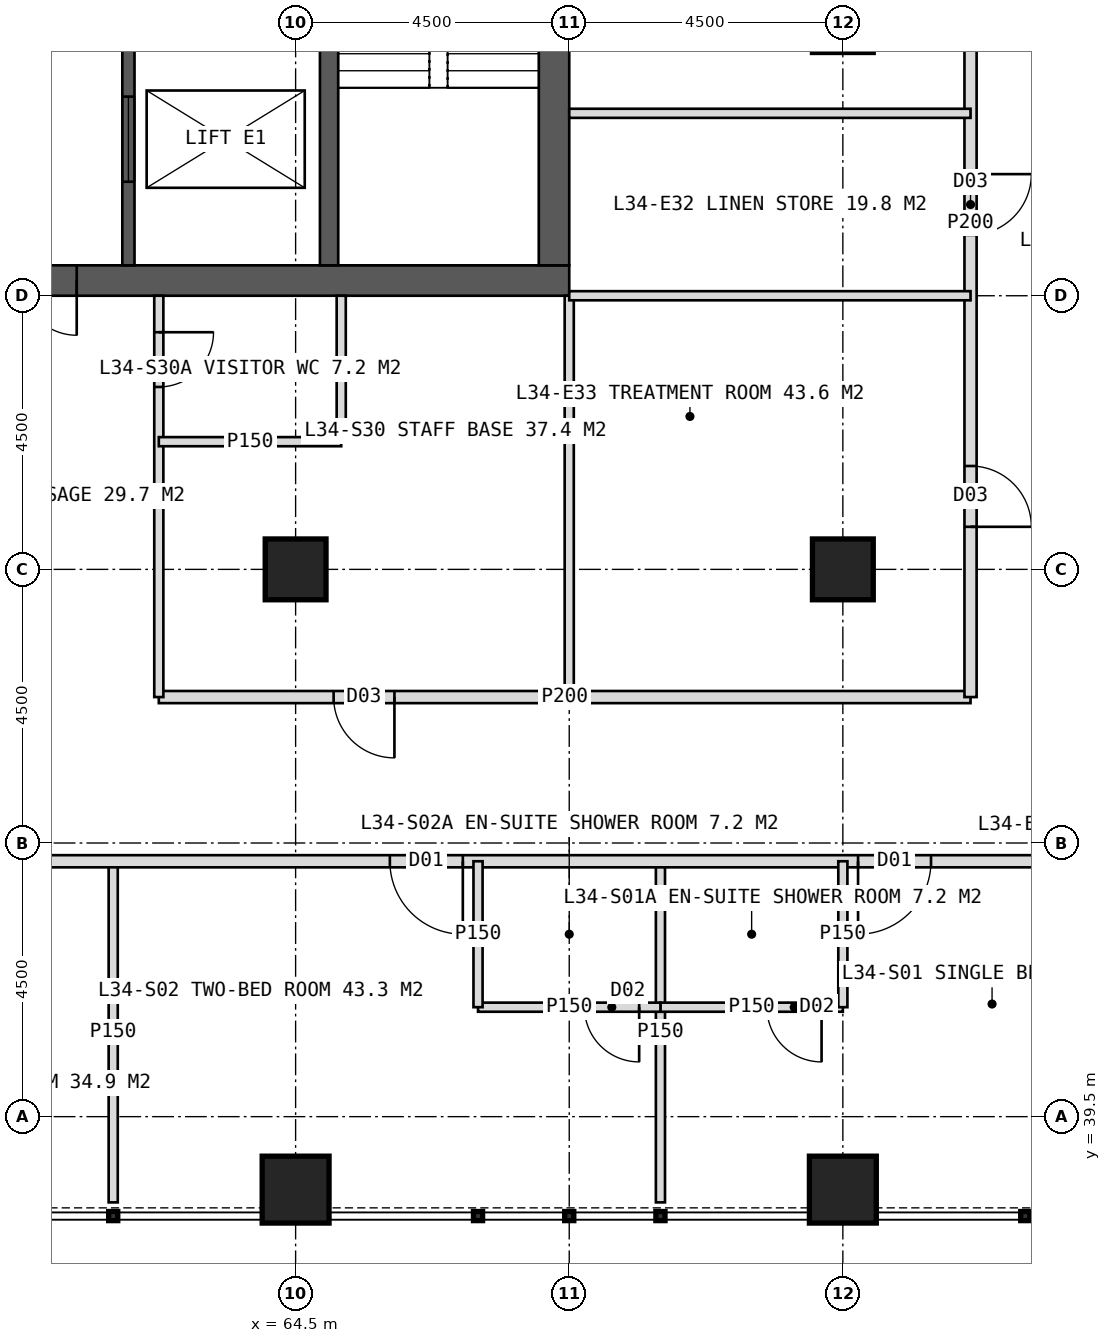
"""IFC4 building model, lengths in metres.
Left out: names, types, materials, properties, quantities, classifications, styles, units other than length and angle.
Written with IfcOpenShell. Run it as: python <this file> out.ifc"""

import sys

from ifc_helpers import new_model, si_unit, direction, frame, frame_2d, origin, origin_2d, place, context, subcontext, project, spatial, rectangle, hollow_rectangle, extrude, element, fill, save


model = new_model("IFC4")
c1 = context("Model", 3, precision=1e-05, world=origin(), true_north=direction((0.0, 1.0)))
c2 = subcontext(c1, "Body", "Model", "MODEL_VIEW")
j1 = project(units=[si_unit("LENGTHUNIT", "METRE"), si_unit("PLANEANGLEUNIT", "RADIAN")], contexts=[c1])
p1 = place(None, origin())
s1 = spatial("IfcSite", under=j1, at=p1, CompositionType="ELEMENT")
p2 = place(p1, origin())
s2 = spatial("IfcBuilding", under=s1, at=p2, CompositionType="ELEMENT")
p3 = place(p2, frame((0.0, 0.0, 144.0)))
s3 = spatial("IfcBuildingStorey", under=s2, at=p3, CompositionType="ELEMENT", Elevation=144.0)
p4 = place(p3, frame((51.0, 53.25, 0.0), z_axis=(0.0, 0.0, 1.0), x_axis=(1.0, 0.0, 0.0)))
e1 = element("IfcWall", 1, at=p4, inside=s3, PredefinedType="SHEAR", context=c2, shape_type="SweptSolid", body=[
    extrude(rectangle(XDim=18.0, YDim=0.5, at=frame_2d((9.0, 0.0))), origin(), (0.0, 0.0, 1.0), 4.0),
])
p5 = place(p4, frame((8.1, 0.0, 0.0)))
e2 = element("IfcOpeningElement", 2, at=p5, cuts=e1, PredefinedType="OPENING", context=c2, shape_type="SweptSolid", body=[
    extrude(rectangle(XDim=1.8, YDim=2.2, at=frame_2d((0.9, 1.1))), frame((0.0, 0.26, 0.0), z_axis=(0.0, -1.0, 0.0), x_axis=(1.0, 0.0, 0.0)), (0.0, 0.0, 1.0), 0.52),
])
p6 = place(p3, frame((68.75, 53.5, 0.0), z_axis=(0.0, 0.0, 1.0), x_axis=(0.0, 1.0, 0.0)))
e3 = element("IfcWall", 3, at=p6, inside=s3, PredefinedType="SHEAR", context=c2, shape_type="SweptSolid", body=[
    extrude(rectangle(XDim=17.0, YDim=0.5, at=frame_2d((8.5, 0.0))), origin(), (0.0, 0.0, 1.0), 4.0),
])
p7 = place(p6, frame((9.5, 0.0, 0.0)))
e4 = element("IfcOpeningElement", 4, at=p7, cuts=e3, PredefinedType="OPENING", context=c2, shape_type="SweptSolid", body=[
    extrude(rectangle(XDim=1.5, YDim=2.2, at=frame_2d((0.75, 1.1))), frame((0.0, 0.26, 0.0), z_axis=(0.0, -1.0, 0.0), x_axis=(1.0, 0.0, 0.0)), (0.0, 0.0, 1.0), 0.52),
])
p8 = place(p3, frame((65.05, 53.5, 0.0), z_axis=(0.0, 0.0, 1.0), x_axis=(0.0, 1.0, 0.0)))
e5 = element("IfcWall", 5, at=p8, inside=s3, PredefinedType="SHEAR", context=c2, shape_type="SweptSolid", body=[
    extrude(rectangle(XDim=17.0, YDim=0.3, at=frame_2d((8.5, 0.0))), origin(), (0.0, 0.0, 1.0), 4.0),
])
p9 = place(p3, frame((61.75, 53.5, 0.0), z_axis=(0.0, 0.0, 1.0), x_axis=(0.0, 1.0, 0.0)))
e6 = element("IfcWall", 6, at=p9, inside=s3, PredefinedType="SHEAR", context=c2, shape_type="SweptSolid", body=[
    extrude(rectangle(XDim=17.0, YDim=0.2, at=frame_2d((8.5, 0.0))), origin(), (0.0, 0.0, 1.0), 4.0),
])
p10 = place(p9, frame((1.375, 0.0, 0.0)))
e7 = element("IfcOpeningElement", 7, at=p10, cuts=e6, PredefinedType="OPENING", context=c2, shape_type="SweptSolid", body=[
    extrude(rectangle(XDim=1.4, YDim=2.2, at=frame_2d((0.7, 1.1))), frame((0.0, 0.11, 0.0), z_axis=(0.0, -1.0, 0.0), x_axis=(1.0, 0.0, 0.0)), (0.0, 0.0, 1.0), 0.22),
])
p11 = place(p9, frame((5.675, 0.0, 0.0)))
e8 = element("IfcOpeningElement", 8, at=p11, cuts=e6, PredefinedType="OPENING", context=c2, shape_type="SweptSolid", body=[
    extrude(rectangle(XDim=1.4, YDim=2.2, at=frame_2d((0.7, 1.1))), frame((0.0, 0.11, 0.0), z_axis=(0.0, -1.0, 0.0), x_axis=(1.0, 0.0, 0.0)), (0.0, 0.0, 1.0), 0.22),
])
for number, where, z_axis, x_axis in (
    (9, (73.5, 48.5, 0.0), (0.0, 0.0, 1.0), (1.0, 0.0, 0.0)),
    (10, (64.5, 48.5, 0.0), (0.0, 0.0, 1.0), (1.0, 0.0, 0.0)),
):
    element("IfcColumn", number, at=place(p3, frame(where, z_axis=z_axis, x_axis=x_axis)), inside=s3, PredefinedType="COLUMN", context=c2, shape_type="SweptSolid", body=[
        extrude(hollow_rectangle(XDim=1.0, YDim=1.0, WallThickness=0.1, at=origin_2d()), origin(), (0.0, 0.0, 1.0), 4.0),
    ])
for number, where, z_axis, x_axis in (
    (11, (64.5, 38.3, 0.0), (0.0, 0.0, 1.0), (1.0, 0.0, 0.0)),
    (12, (73.5, 38.3, 0.0), (0.0, 0.0, 1.0), (1.0, 0.0, 0.0)),
):
    element("IfcColumn", number, at=place(p3, frame(where, z_axis=z_axis, x_axis=x_axis)), inside=s3, PredefinedType="COLUMN", context=c2, shape_type="SweptSolid", body=[
        extrude(hollow_rectangle(XDim=1.1, YDim=1.1, WallThickness=0.1, at=origin_2d()), origin(), (0.0, 0.0, 1.0), 4.0),
    ])
for number, where, z_axis, x_axis in (
    (13, (70.5, 43.7, 0.0), (0.0, 0.0, 1.0), (0.0, -1.0, 0.0)),
    (14, (61.5, 43.7, 0.0), (0.0, 0.0, 1.0), (0.0, -1.0, 0.0)),
):
    element("IfcWall", number, at=place(p3, frame(where, z_axis=z_axis, x_axis=x_axis)), inside=s3, PredefinedType="PARTITIONING", context=c2, shape_type="SweptSolid", body=[
        extrude(rectangle(XDim=5.61, YDim=0.15, at=frame_2d((2.805, 0.0))), origin(), (0.0, 0.0, 1.0), 3.75),
    ])
p12 = place(p3, frame((78.3, 43.7, 0.0), z_axis=(0.0, 0.0, 1.0), x_axis=(-1.0, 0.0, 0.0)))
e15 = element("IfcWall", 15, at=p12, inside=s3, PredefinedType="PARTITIONING", context=c2, shape_type="SweptSolid", body=[
    extrude(rectangle(XDim=36.6, YDim=0.2, at=frame_2d((18.3, 0.0))), origin(), (0.0, 0.0, 1.0), 3.75),
])
p13 = place(p12, frame((3.35, 0.0, 0.0)))
e16 = element("IfcOpeningElement", 16, at=p13, cuts=e15, PredefinedType="OPENING", context=c2, shape_type="SweptSolid", body=[
    extrude(rectangle(XDim=1.2, YDim=2.2, at=frame_2d((0.6, 1.1))), frame((0.0, 0.11, 0.0), z_axis=(0.0, -1.0, 0.0), x_axis=(1.0, 0.0, 0.0)), (0.0, 0.0, 1.0), 0.22),
])
p14 = place(p12, frame((11.05, 0.0, 0.0)))
e17 = element("IfcOpeningElement", 17, at=p14, cuts=e15, PredefinedType="OPENING", context=c2, shape_type="SweptSolid", body=[
    extrude(rectangle(XDim=1.2, YDim=2.2, at=frame_2d((0.6, 1.1))), frame((0.0, 0.11, 0.0), z_axis=(0.0, -1.0, 0.0), x_axis=(1.0, 0.0, 0.0)), (0.0, 0.0, 1.0), 0.22),
])
p15 = place(p12, frame((19.85, 0.0, 0.0)))
e18 = element("IfcOpeningElement", 18, at=p15, cuts=e15, PredefinedType="OPENING", context=c2, shape_type="SweptSolid", body=[
    extrude(rectangle(XDim=1.2, YDim=2.2, at=frame_2d((0.6, 1.1))), frame((0.0, 0.11, 0.0), z_axis=(0.0, -1.0, 0.0), x_axis=(1.0, 0.0, 0.0)), (0.0, 0.0, 1.0), 0.22),
])
p16 = place(p12, frame((26.95, 0.0, 0.0)))
e19 = element("IfcOpeningElement", 19, at=p16, cuts=e15, PredefinedType="OPENING", context=c2, shape_type="SweptSolid", body=[
    extrude(rectangle(XDim=1.2, YDim=2.2, at=frame_2d((0.6, 1.1))), frame((0.0, 0.11, 0.0), z_axis=(0.0, -1.0, 0.0), x_axis=(1.0, 0.0, 0.0)), (0.0, 0.0, 1.0), 0.22),
])
p17 = place(p3, frame((73.5, 41.3, 0.0), z_axis=(0.0, 0.0, 1.0), x_axis=(-1.0, 0.0, 0.0)))
e20 = element("IfcWall", 20, at=p17, inside=s3, PredefinedType="PARTITIONING", context=c2, shape_type="SweptSolid", body=[
    extrude(rectangle(XDim=3.0, YDim=0.15, at=frame_2d((1.5, 0.0))), origin(), (0.0, 0.0, 1.0), 3.75),
])
p18 = place(p17, frame((0.35, 0.0, 0.0)))
e21 = element("IfcOpeningElement", 21, at=p18, cuts=e20, PredefinedType="OPENING", context=c2, shape_type="SweptSolid", body=[
    extrude(rectangle(XDim=0.9, YDim=2.1, at=frame_2d((0.45, 1.05))), frame((0.0, 0.085, 0.0), z_axis=(0.0, -1.0, 0.0), x_axis=(1.0, 0.0, 0.0)), (0.0, 0.0, 1.0), 0.17),
])
p19 = place(p3, frame((73.5, 43.7, 0.0), z_axis=(0.0, 0.0, 1.0), x_axis=(0.0, -1.0, 0.0)))
e22 = element("IfcWall", 22, at=p19, inside=s3, PredefinedType="PARTITIONING", context=c2, shape_type="SweptSolid", body=[
    extrude(rectangle(XDim=2.4, YDim=0.15, at=frame_2d((1.2, 0.0))), origin(), (0.0, 0.0, 1.0), 2.95),
])
p20 = place(p3, frame((70.5, 41.3, 0.0), z_axis=(0.0, 0.0, 1.0), x_axis=(-1.0, 0.0, 0.0)))
e23 = element("IfcWall", 23, at=p20, inside=s3, PredefinedType="PARTITIONING", context=c2, shape_type="SweptSolid", body=[
    extrude(rectangle(XDim=3.0, YDim=0.15, at=frame_2d((1.5, 0.0))), origin(), (0.0, 0.0, 1.0), 3.75),
])
p21 = place(p20, frame((0.35, 0.0, 0.0)))
e24 = element("IfcOpeningElement", 24, at=p21, cuts=e23, PredefinedType="OPENING", context=c2, shape_type="SweptSolid", body=[
    extrude(rectangle(XDim=0.9, YDim=2.1, at=frame_2d((0.45, 1.05))), frame((0.0, 0.085, 0.0), z_axis=(0.0, -1.0, 0.0), x_axis=(1.0, 0.0, 0.0)), (0.0, 0.0, 1.0), 0.17),
])
p22 = place(p3, frame((67.5, 43.7, 0.0), z_axis=(0.0, 0.0, 1.0), x_axis=(0.0, -1.0, 0.0)))
e25 = element("IfcWall", 25, at=p22, inside=s3, PredefinedType="PARTITIONING", context=c2, shape_type="SweptSolid", body=[
    extrude(rectangle(XDim=2.4, YDim=0.15, at=frame_2d((1.2, 0.0))), origin(), (0.0, 0.0, 1.0), 3.75),
])
p23 = place(p3, frame((69.0, 53.0, 0.0), z_axis=(0.0, 0.0, 1.0), x_axis=(0.0, -1.0, 0.0)))
e26 = element("IfcWall", 26, at=p23, inside=s3, PredefinedType="PARTITIONING", context=c2, shape_type="SweptSolid", body=[
    extrude(rectangle(XDim=6.6, YDim=0.15, at=frame_2d((3.3, 0.0))), origin(), (0.0, 0.0, 1.0), 3.75),
])
p24 = place(p3, frame((75.6, 46.4, 0.0), z_axis=(0.0, 0.0, 1.0), x_axis=(-1.0, 0.0, 0.0)))
e27 = element("IfcWall", 27, at=p24, inside=s3, PredefinedType="PARTITIONING", context=c2, shape_type="SweptSolid", body=[
    extrude(rectangle(XDim=13.35, YDim=0.2, at=frame_2d((6.675, 0.0))), origin(), (0.0, 0.0, 1.0), 3.75),
])
p25 = place(p24, frame((9.475, 0.0, 0.0)))
e28 = element("IfcOpeningElement", 28, at=p25, cuts=e27, PredefinedType="OPENING", context=c2, shape_type="SweptSolid", body=[
    extrude(rectangle(XDim=1.0, YDim=2.1, at=frame_2d((0.5, 1.05))), frame((0.0, 0.11, 0.0), z_axis=(0.0, -1.0, 0.0), x_axis=(1.0, 0.0, 0.0)), (0.0, 0.0, 1.0), 0.22),
])
p26 = place(p3, frame((62.25, 53.0, 0.0), z_axis=(0.0, 0.0, 1.0), x_axis=(0.0, -1.0, 0.0)))
e29 = element("IfcWall", 29, at=p26, inside=s3, PredefinedType="PARTITIONING", context=c2, shape_type="SweptSolid", body=[
    extrude(rectangle(XDim=6.6, YDim=0.15, at=frame_2d((3.3, 0.0))), origin(), (0.0, 0.0, 1.0), 3.75),
])
p27 = place(p26, frame((0.6, 0.0, 0.0)))
e30 = element("IfcOpeningElement", 30, at=p27, cuts=e29, PredefinedType="OPENING", context=c2, shape_type="SweptSolid", body=[
    extrude(rectangle(XDim=0.9, YDim=2.1, at=frame_2d((0.45, 1.05))), frame((0.0, 0.085, 0.0), z_axis=(0.0, -1.0, 0.0), x_axis=(1.0, 0.0, 0.0)), (0.0, 0.0, 1.0), 0.17),
])
p28 = place(p3, frame((65.25, 50.6, 0.0), z_axis=(0.0, 0.0, 1.0), x_axis=(-1.0, 0.0, 0.0)))
e31 = element("IfcWall", 31, at=p28, inside=s3, PredefinedType="PARTITIONING", context=c2, shape_type="SweptSolid", body=[
    extrude(rectangle(XDim=3.0, YDim=0.15, at=frame_2d((1.5, 0.0))), origin(), (0.0, 0.0, 1.0), 3.75),
])
p29 = place(p3, frame((65.25, 53.0, 0.0), z_axis=(0.0, 0.0, 1.0), x_axis=(0.0, -1.0, 0.0)))
e32 = element("IfcWall", 32, at=p29, inside=s3, PredefinedType="PARTITIONING", context=c2, shape_type="SweptSolid", body=[
    extrude(rectangle(XDim=2.4, YDim=0.15, at=frame_2d((1.2, 0.0))), origin(), (0.0, 0.0, 1.0), 3.75),
])
p30 = place(p3, frame((75.6, 62.0, 0.0), z_axis=(0.0, 0.0, 1.0), x_axis=(0.0, -1.0, 0.0)))
e33 = element("IfcWall", 33, at=p30, inside=s3, PredefinedType="PARTITIONING", context=c2, shape_type="SweptSolid", body=[
    extrude(rectangle(XDim=15.6, YDim=0.2, at=frame_2d((7.8, 0.0))), origin(), (0.0, 0.0, 1.0), 3.75),
])
p31 = place(p30, frame((2.5, 0.0, 0.0)))
e34 = element("IfcOpeningElement", 34, at=p31, cuts=e33, PredefinedType="OPENING", context=c2, shape_type="SweptSolid", body=[
    extrude(rectangle(XDim=1.0, YDim=2.1, at=frame_2d((0.5, 1.05))), frame((0.0, 0.11, 0.0), z_axis=(0.0, -1.0, 0.0), x_axis=(1.0, 0.0, 0.0)), (0.0, 0.0, 1.0), 0.22),
])
p32 = place(p30, frame((7.0, 0.0, 0.0)))
e35 = element("IfcOpeningElement", 35, at=p32, cuts=e33, PredefinedType="OPENING", context=c2, shape_type="SweptSolid", body=[
    extrude(rectangle(XDim=1.0, YDim=2.1, at=frame_2d((0.5, 1.05))), frame((0.0, 0.11, 0.0), z_axis=(0.0, -1.0, 0.0), x_axis=(1.0, 0.0, 0.0)), (0.0, 0.0, 1.0), 0.22),
])
p33 = place(p30, frame((11.8, 0.0, 0.0)))
e36 = element("IfcOpeningElement", 36, at=p33, cuts=e33, PredefinedType="OPENING", context=c2, shape_type="SweptSolid", body=[
    extrude(rectangle(XDim=1.0, YDim=2.1, at=frame_2d((0.5, 1.05))), frame((0.0, 0.11, 0.0), z_axis=(0.0, -1.0, 0.0), x_axis=(1.0, 0.0, 0.0)), (0.0, 0.0, 1.0), 0.22),
])
for number, where, z_axis, x_axis in (
    (37, (69.0, 56.0, 0.0), (0.0, 0.0, 1.0), (1.0, 0.0, 0.0)),
    (38, (69.0, 53.0, 0.0), (0.0, 0.0, 1.0), (1.0, 0.0, 0.0)),
):
    element("IfcWall", number, at=place(p3, frame(where, z_axis=z_axis, x_axis=x_axis)), inside=s3, PredefinedType="PARTITIONING", context=c2, shape_type="SweptSolid", body=[
        extrude(rectangle(XDim=6.6, YDim=0.15, at=frame_2d((3.3, 0.0))), origin(), (0.0, 0.0, 1.0), 3.75),
    ])
p34 = place(p13, origin())
e39 = element("IfcDoor", 39, at=p34, inside=s3, OperationType="SINGLE_SWING_RIGHT", PredefinedType="DOOR", context=c2, shape_type="SweptSolid", body=[
    extrude(rectangle(XDim=1.2, YDim=2.2, at=frame_2d((0.6, 1.1))), frame((0.0, 0.025, 0.0), z_axis=(0.0, -1.0, 0.0), x_axis=(1.0, 0.0, 0.0)), (0.0, 0.0, 1.0), 0.05),
])
fill(e16, e39)
p35 = place(p18, origin())
e40 = element("IfcDoor", 40, at=p35, inside=s3, OperationType="SINGLE_SWING_LEFT", PredefinedType="DOOR", context=c2, shape_type="SweptSolid", body=[
    extrude(rectangle(XDim=0.9, YDim=2.1, at=frame_2d((0.45, 1.05))), frame((0.0, 0.025, 0.0), z_axis=(0.0, -1.0, 0.0), x_axis=(1.0, 0.0, 0.0)), (0.0, 0.0, 1.0), 0.05),
])
fill(e21, e40)
p36 = place(p14, origin())
e41 = element("IfcDoor", 41, at=p36, inside=s3, OperationType="SINGLE_SWING_LEFT", PredefinedType="DOOR", context=c2, shape_type="SweptSolid", body=[
    extrude(rectangle(XDim=1.2, YDim=2.2, at=frame_2d((0.6, 1.1))), frame((0.0, 0.025, 0.0), z_axis=(0.0, -1.0, 0.0), x_axis=(1.0, 0.0, 0.0)), (0.0, 0.0, 1.0), 0.05),
])
fill(e17, e41)
p37 = place(p21, origin())
e42 = element("IfcDoor", 42, at=p37, inside=s3, OperationType="SINGLE_SWING_LEFT", PredefinedType="DOOR", context=c2, shape_type="SweptSolid", body=[
    extrude(rectangle(XDim=0.9, YDim=2.1, at=frame_2d((0.45, 1.05))), frame((0.0, 0.025, 0.0), z_axis=(0.0, -1.0, 0.0), x_axis=(1.0, 0.0, 0.0)), (0.0, 0.0, 1.0), 0.05),
])
fill(e24, e42)
p38 = place(p27, origin())
e43 = element("IfcDoor", 43, at=p38, inside=s3, OperationType="SINGLE_SWING_LEFT", PredefinedType="DOOR", context=c2, shape_type="SweptSolid", body=[
    extrude(rectangle(XDim=0.9, YDim=2.1, at=frame_2d((0.45, 1.05))), frame((0.0, 0.025, 0.0), z_axis=(0.0, -1.0, 0.0), x_axis=(1.0, 0.0, 0.0)), (0.0, 0.0, 1.0), 0.05),
])
fill(e30, e43)
p39 = place(p25, origin())
e44 = element("IfcDoor", 44, at=p39, inside=s3, OperationType="SINGLE_SWING_LEFT", PredefinedType="DOOR", context=c2, shape_type="SweptSolid", body=[
    extrude(rectangle(XDim=1.0, YDim=2.1, at=frame_2d((0.5, 1.05))), frame((0.0, 0.025, 0.0), z_axis=(0.0, -1.0, 0.0), x_axis=(1.0, 0.0, 0.0)), (0.0, 0.0, 1.0), 0.05),
])
fill(e28, e44)
p40 = place(p32, origin())
e45 = element("IfcDoor", 45, at=p40, inside=s3, OperationType="SINGLE_SWING_LEFT", PredefinedType="DOOR", context=c2, shape_type="SweptSolid", body=[
    extrude(rectangle(XDim=1.0, YDim=2.1, at=frame_2d((0.5, 1.05))), frame((0.0, 0.025, 0.0), z_axis=(0.0, -1.0, 0.0), x_axis=(1.0, 0.0, 0.0)), (0.0, 0.0, 1.0), 0.05),
])
fill(e35, e45)
p41 = place(p33, origin())
e46 = element("IfcDoor", 46, at=p41, inside=s3, OperationType="SINGLE_SWING_RIGHT", PredefinedType="DOOR", context=c2, shape_type="SweptSolid", body=[
    extrude(rectangle(XDim=1.0, YDim=2.1, at=frame_2d((0.5, 1.05))), frame((0.0, 0.025, 0.0), z_axis=(0.0, -1.0, 0.0), x_axis=(1.0, 0.0, 0.0)), (0.0, 0.0, 1.0), 0.05),
])
fill(e36, e46)
p42 = place(p5, origin())
e47 = element("IfcDoor", 47, at=p42, inside=s3, OperationType="DOUBLE_DOOR_SINGLE_SWING", PredefinedType="DOOR", context=c2, shape_type="SweptSolid", body=[
    extrude(rectangle(XDim=1.8, YDim=2.2, at=frame_2d((0.9, 1.1))), frame((0.0, 0.025, 0.0), z_axis=(0.0, -1.0, 0.0), x_axis=(1.0, 0.0, 0.0)), (0.0, 0.0, 1.0), 0.05),
])
fill(e2, e47)
p43 = place(p10, origin())
e48 = element("IfcDoor", 48, at=p43, inside=s3, OperationType="SLIDING_TO_LEFT", PredefinedType="DOOR", context=c2, shape_type="SweptSolid", body=[
    extrude(rectangle(XDim=1.4, YDim=2.2, at=frame_2d((0.7, 1.1))), frame((0.0, 0.025, 0.0), z_axis=(0.0, -1.0, 0.0), x_axis=(1.0, 0.0, 0.0)), (0.0, 0.0, 1.0), 0.05),
])
fill(e7, e48)
save(model, sys.argv[1])
